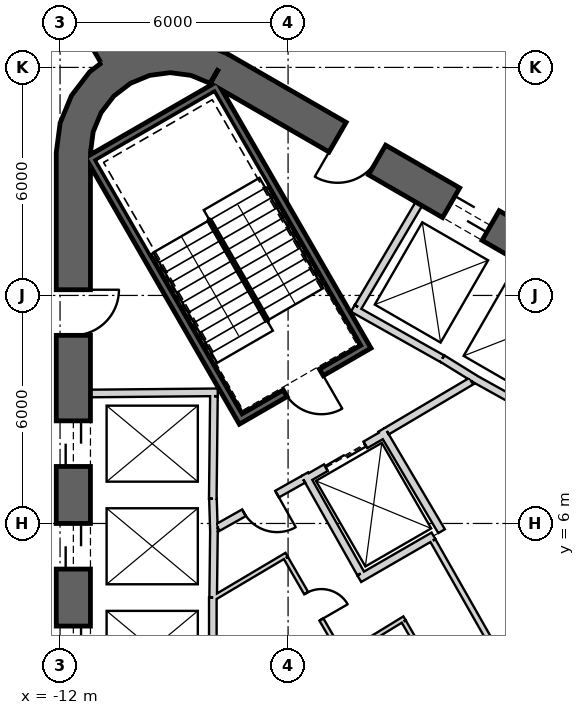
"""IFC4 building model, lengths in metres.
Left out: names, types, materials, properties, quantities, classifications, styles, units other than length and angle.
Written with IfcOpenShell. Run it as: python <this file> out.ifc"""

import sys

from ifc_helpers import new_model, si_unit, direction, frame, frame_2d, origin, place, context, subcontext, project, spatial, polyline, rectangle, outline, extrude, element, fill, save


model = new_model("IFC4")
c1 = context("Model", 3, precision=1e-05, world=origin(), true_north=direction((0.0, 1.0)))
c2 = subcontext(c1, "Body", "Model", "MODEL_VIEW")
j1 = project(units=[si_unit("LENGTHUNIT", "METRE"), si_unit("PLANEANGLEUNIT", "RADIAN")], contexts=[c1])
p1 = place(None, origin())
s1 = spatial("IfcSite", under=j1, at=p1, CompositionType="ELEMENT")
p2 = place(p1, origin())
s2 = spatial("IfcBuilding", under=s1, at=p2, CompositionType="ELEMENT")
p3 = place(p2, frame((0.0, 0.0, 94.7)))
s3 = spatial("IfcBuildingStorey", under=s2, at=p3, CompositionType="ELEMENT", Elevation=94.7)
p4 = place(p3, frame((19.475, 2.208, 0.0), z_axis=(0.0, 0.0, 1.0), x_axis=(-0.866028369851, 0.499994862586, 0.0)))
e1 = element("IfcWall", 1, at=p4, inside=s3, PredefinedType="SHEAR", context=c2, shape_type="SweptSolid", body=[
    extrude(rectangle(XDim=31.523, YDim=0.9, at=frame_2d((15.762, 0.0))), origin(), (0.0, 0.0, 1.0), 4.1),
])
p5 = place(p4, frame((7.062, 0.0, 0.0)))
e2 = element("IfcOpeningElement", 2, at=p5, cuts=e1, PredefinedType="OPENING", context=c2, shape_type="SweptSolid", body=[
    extrude(rectangle(XDim=1.2, YDim=2.4, at=frame_2d((0.6, 1.2))), frame((0.0, 0.46, 0.0), z_axis=(0.0, -1.0, 0.0), x_axis=(1.0, 0.0, 0.0)), (0.0, 0.0, 1.0), 0.92),
])
p6 = place(p4, frame((9.762, 0.0, 0.0)))
e3 = element("IfcOpeningElement", 3, at=p6, cuts=e1, PredefinedType="OPENING", context=c2, shape_type="SweptSolid", body=[
    extrude(rectangle(XDim=1.2, YDim=2.4, at=frame_2d((0.6, 1.2))), frame((0.0, 0.46, 0.0), z_axis=(0.0, -1.0, 0.0), x_axis=(1.0, 0.0, 0.0)), (0.0, 0.0, 1.0), 0.92),
])
p7 = place(p4, frame((12.462, 0.0, 0.0)))
e4 = element("IfcOpeningElement", 4, at=p7, cuts=e1, PredefinedType="OPENING", context=c2, shape_type="SweptSolid", body=[
    extrude(rectangle(XDim=1.2, YDim=2.4, at=frame_2d((0.6, 1.2))), frame((0.0, 0.46, 0.0), z_axis=(0.0, -1.0, 0.0), x_axis=(1.0, 0.0, 0.0)), (0.0, 0.0, 1.0), 0.92),
])
p8 = place(p4, frame((15.162, 0.0, 0.0)))
e5 = element("IfcOpeningElement", 5, at=p8, cuts=e1, PredefinedType="OPENING", context=c2, shape_type="SweptSolid", body=[
    extrude(rectangle(XDim=1.2, YDim=2.4, at=frame_2d((0.6, 1.2))), frame((0.0, 0.46, 0.0), z_axis=(0.0, -1.0, 0.0), x_axis=(1.0, 0.0, 0.0)), (0.0, 0.0, 1.0), 0.92),
])
p9 = place(p4, frame((17.862, 0.0, 0.0)))
e6 = element("IfcOpeningElement", 6, at=p9, cuts=e1, PredefinedType="OPENING", context=c2, shape_type="SweptSolid", body=[
    extrude(rectangle(XDim=1.2, YDim=2.4, at=frame_2d((0.6, 1.2))), frame((0.0, 0.46, 0.0), z_axis=(0.0, -1.0, 0.0), x_axis=(1.0, 0.0, 0.0)), (0.0, 0.0, 1.0), 0.92),
])
p10 = place(p4, frame((20.562, 0.0, 0.0)))
e7 = element("IfcOpeningElement", 7, at=p10, cuts=e1, PredefinedType="OPENING", context=c2, shape_type="SweptSolid", body=[
    extrude(rectangle(XDim=1.2, YDim=2.4, at=frame_2d((0.6, 1.2))), frame((0.0, 0.46, 0.0), z_axis=(0.0, -1.0, 0.0), x_axis=(1.0, 0.0, 0.0)), (0.0, 0.0, 1.0), 0.92),
])
p11 = place(p4, frame((23.262, 0.0, 0.0)))
e8 = element("IfcOpeningElement", 8, at=p11, cuts=e1, PredefinedType="OPENING", context=c2, shape_type="SweptSolid", body=[
    extrude(rectangle(XDim=1.2, YDim=2.4, at=frame_2d((0.6, 1.2))), frame((0.0, 0.46, 0.0), z_axis=(0.0, -1.0, 0.0), x_axis=(1.0, 0.0, 0.0)), (0.0, 0.0, 1.0), 0.92),
])
p12 = place(p4, frame((3.612, 0.0, 0.0)))
e9 = element("IfcOpeningElement", 9, at=p12, cuts=e1, PredefinedType="OPENING", context=c2, shape_type="SweptSolid", body=[
    extrude(rectangle(XDim=1.2, YDim=2.4, at=frame_2d((0.6, 1.2))), frame((0.0, 0.46, 0.0), z_axis=(0.0, -1.0, 0.0), x_axis=(1.0, 0.0, 0.0)), (0.0, 0.0, 1.0), 0.92),
])
p13 = place(p4, frame((26.712, 0.0, 0.0)))
e10 = element("IfcOpeningElement", 10, at=p13, cuts=e1, PredefinedType="OPENING", context=c2, shape_type="SweptSolid", body=[
    extrude(rectangle(XDim=1.2, YDim=2.4, at=frame_2d((0.6, 1.2))), frame((0.0, 0.46, 0.0), z_axis=(0.0, -1.0, 0.0), x_axis=(1.0, 0.0, 0.0)), (0.0, 0.0, 1.0), 0.92),
])
p14 = place(p3, frame((-11.65, 15.762, 0.0), z_axis=(0.0, 0.0, 1.0), x_axis=(0.0, -1.0, 0.0)))
e11 = element("IfcWall", 11, at=p14, inside=s3, PredefinedType="SHEAR", context=c2, shape_type="SweptSolid", body=[
    extrude(rectangle(XDim=31.523, YDim=0.9, at=frame_2d((15.762, 0.0))), origin(), (0.0, 0.0, 1.0), 4.1),
])
p15 = place(p14, frame((7.062, 0.0, 0.0)))
e12 = element("IfcOpeningElement", 12, at=p15, cuts=e11, PredefinedType="OPENING", context=c2, shape_type="SweptSolid", body=[
    extrude(rectangle(XDim=1.2, YDim=2.4, at=frame_2d((0.6, 1.2))), frame((0.0, 0.46, 0.0), z_axis=(0.0, -1.0, 0.0), x_axis=(1.0, 0.0, 0.0)), (0.0, 0.0, 1.0), 0.92),
])
p16 = place(p14, frame((9.762, 0.0, 0.0)))
e13 = element("IfcOpeningElement", 13, at=p16, cuts=e11, PredefinedType="OPENING", context=c2, shape_type="SweptSolid", body=[
    extrude(rectangle(XDim=1.2, YDim=2.4, at=frame_2d((0.6, 1.2))), frame((0.0, 0.46, 0.0), z_axis=(0.0, -1.0, 0.0), x_axis=(1.0, 0.0, 0.0)), (0.0, 0.0, 1.0), 0.92),
])
p17 = place(p14, frame((12.462, 0.0, 0.0)))
e14 = element("IfcOpeningElement", 14, at=p17, cuts=e11, PredefinedType="OPENING", context=c2, shape_type="SweptSolid", body=[
    extrude(rectangle(XDim=1.2, YDim=2.4, at=frame_2d((0.6, 1.2))), frame((0.0, 0.46, 0.0), z_axis=(0.0, -1.0, 0.0), x_axis=(1.0, 0.0, 0.0)), (0.0, 0.0, 1.0), 0.92),
])
p18 = place(p14, frame((15.162, 0.0, 0.0)))
e15 = element("IfcOpeningElement", 15, at=p18, cuts=e11, PredefinedType="OPENING", context=c2, shape_type="SweptSolid", body=[
    extrude(rectangle(XDim=1.2, YDim=2.4, at=frame_2d((0.6, 1.2))), frame((0.0, 0.46, 0.0), z_axis=(0.0, -1.0, 0.0), x_axis=(1.0, 0.0, 0.0)), (0.0, 0.0, 1.0), 0.92),
])
p19 = place(p14, frame((17.862, 0.0, 0.0)))
e16 = element("IfcOpeningElement", 16, at=p19, cuts=e11, PredefinedType="OPENING", context=c2, shape_type="SweptSolid", body=[
    extrude(rectangle(XDim=1.2, YDim=2.4, at=frame_2d((0.6, 1.2))), frame((0.0, 0.46, 0.0), z_axis=(0.0, -1.0, 0.0), x_axis=(1.0, 0.0, 0.0)), (0.0, 0.0, 1.0), 0.92),
])
p20 = place(p14, frame((20.562, 0.0, 0.0)))
e17 = element("IfcOpeningElement", 17, at=p20, cuts=e11, PredefinedType="OPENING", context=c2, shape_type="SweptSolid", body=[
    extrude(rectangle(XDim=1.2, YDim=2.4, at=frame_2d((0.6, 1.2))), frame((0.0, 0.46, 0.0), z_axis=(0.0, -1.0, 0.0), x_axis=(1.0, 0.0, 0.0)), (0.0, 0.0, 1.0), 0.92),
])
p21 = place(p14, frame((23.262, 0.0, 0.0)))
e18 = element("IfcOpeningElement", 18, at=p21, cuts=e11, PredefinedType="OPENING", context=c2, shape_type="SweptSolid", body=[
    extrude(rectangle(XDim=1.2, YDim=2.4, at=frame_2d((0.6, 1.2))), frame((0.0, 0.46, 0.0), z_axis=(0.0, -1.0, 0.0), x_axis=(1.0, 0.0, 0.0)), (0.0, 0.0, 1.0), 0.92),
])
p22 = place(p14, frame((3.612, 0.0, 0.0)))
e19 = element("IfcOpeningElement", 19, at=p22, cuts=e11, PredefinedType="OPENING", context=c2, shape_type="SweptSolid", body=[
    extrude(rectangle(XDim=1.2, YDim=2.4, at=frame_2d((0.6, 1.2))), frame((0.0, 0.46, 0.0), z_axis=(0.0, -1.0, 0.0), x_axis=(1.0, 0.0, 0.0)), (0.0, 0.0, 1.0), 0.92),
])
p23 = place(p14, frame((26.712, 0.0, 0.0)))
e20 = element("IfcOpeningElement", 20, at=p23, cuts=e11, PredefinedType="OPENING", context=c2, shape_type="SweptSolid", body=[
    extrude(rectangle(XDim=1.2, YDim=2.4, at=frame_2d((0.6, 1.2))), frame((0.0, 0.46, 0.0), z_axis=(0.0, -1.0, 0.0), x_axis=(1.0, 0.0, 0.0)), (0.0, 0.0, 1.0), 0.92),
])
p24 = place(p3, origin())
e21 = element("IfcWall", 21, at=p24, inside=s3, PredefinedType="SHEAR", context=c2, shape_type="SweptSolid", body=[
    extrude(outline(polyline([(-7.6, 18.36), (-8.323, 18.659), (-9.1, 18.762), (-9.876, 18.659), (-10.6, 18.36), (-11.221, 17.883), (-11.698, 17.262), (-11.998, 16.538), (-12.1, 15.762), (-11.2, 15.762), (-11.128, 16.305), (-10.919, 16.812), (-10.585, 17.247), (-10.15, 17.58), (-9.644, 17.79), (-9.1, 17.862), (-8.556, 17.79), (-8.05, 17.58), (-7.6, 18.36)])), origin(), (0.0, 0.0, 1.0), 4.1),
])
p25 = place(p3, frame((-10.575, 18.316, 0.0), z_axis=(0.0, 0.0, 1.0), x_axis=(-0.500006018292, 0.866021929094, 0.0)))
e22 = element("IfcWall", 22, at=p25, inside=s3, PredefinedType="SHEAR", context=c2, shape_type="SweptSolid", body=[
    extrude(rectangle(XDim=13.241, YDim=0.8, at=frame_2d((6.621, 0.0))), origin(), (0.0, 0.0, 1.0), 4.1),
])
p26 = place(p25, frame((1.9, 0.0, 0.0)))
e23 = element("IfcOpeningElement", 23, at=p26, cuts=e22, PredefinedType="OPENING", context=c2, shape_type="SweptSolid", body=[
    extrude(rectangle(XDim=1.4, YDim=2.4, at=frame_2d((0.7, 1.2))), frame((0.0, 0.41, 0.0), z_axis=(0.0, -1.0, 0.0), x_axis=(1.0, 0.0, 0.0)), (0.0, 0.0, 1.0), 0.82),
])
p27 = place(p3, frame((-11.2, 9.42, 0.0), z_axis=(0.0, 0.0, 1.0), x_axis=(0.999957167047, 0.009255488683, 0.0)))
e24 = element("IfcWall", 24, at=p27, inside=s3, PredefinedType="PLUMBINGWALL", context=c2, shape_type="SweptSolid", body=[
    extrude(rectangle(XDim=3.35, YDim=0.2, at=frame_2d((1.675, 0.0))), origin(), (0.0, 0.0, 1.0), 3.8),
])
p28 = place(p3, frame((-7.951, 9.35, 0.0), z_axis=(0.0, 0.0, 1.0), x_axis=(-0.011120469654, -0.999938165666, 0.0)))
e25 = element("IfcWall", 25, at=p28, inside=s3, PredefinedType="PLUMBINGWALL", context=c2, shape_type="SweptSolid", body=[
    extrude(rectangle(XDim=2.7, YDim=0.2, at=frame_2d((1.35, 0.0))), origin(), (0.0, 0.0, 1.0), 3.8),
])
p29 = place(p3, frame((-7.977, 6.65, 0.0), z_axis=(0.0, 0.0, 1.0), x_axis=(0.030861509705, -0.999523670164, 0.0)))
e26 = element("IfcWall", 26, at=p29, inside=s3, PredefinedType="PLUMBINGWALL", context=c2, shape_type="SweptSolid", body=[
    extrude(rectangle(XDim=0.878, YDim=0.2, at=frame_2d((0.439, 0.0))), origin(), (0.0, 0.0, 1.0), 3.8),
])
p30 = place(p3, frame((-7.949, 5.895, 0.0), z_axis=(0.0, 0.0, 1.0), x_axis=(-0.012042535896, -0.999927486035, 0.0)))
e27 = element("IfcWall", 27, at=p30, inside=s3, PredefinedType="PLUMBINGWALL", context=c2, shape_type="SweptSolid", body=[
    extrude(rectangle(XDim=1.845, YDim=0.2, at=frame_2d((0.922, 0.0))), origin(), (0.0, 0.0, 1.0), 3.8),
])
p31 = place(p3, frame((-7.98, 4.05, 0.0), z_axis=(0.0, 0.0, 1.0), x_axis=(0.0, -1.0, 0.0)))
e28 = element("IfcWall", 28, at=p31, inside=s3, PredefinedType="PLUMBINGWALL", context=c2, shape_type="SweptSolid", body=[
    extrude(rectangle(XDim=8.1, YDim=0.2, at=frame_2d((4.05, 0.0))), origin(), (0.0, 0.0, 1.0), 3.8),
])
p32 = place(p3, frame((-1.941, 10.339, 0.0), z_axis=(0.0, 0.0, 1.0), x_axis=(0.850216889117, -0.526432561171, 0.0)))
e29 = element("IfcWall", 29, at=p32, inside=s3, PredefinedType="PLUMBINGWALL", context=c2, shape_type="SweptSolid", body=[
    extrude(rectangle(XDim=1.078, YDim=0.2, at=frame_2d((0.539, 0.0))), origin(), (0.0, 0.0, 1.0), 3.8),
])
p33 = place(p3, frame((0.483, 8.936, 0.0), z_axis=(0.0, 0.0, 1.0), x_axis=(-0.874269620932, 0.485440655401, 0.0)))
e30 = element("IfcWall", 30, at=p33, inside=s3, PredefinedType="PLUMBINGWALL", context=c2, shape_type="SweptSolid", body=[
    extrude(rectangle(XDim=1.845, YDim=0.2, at=frame_2d((0.922, 0.0))), origin(), (0.0, 0.0, 1.0), 3.8),
])
p34 = place(p3, frame((-4.296, 11.659, 0.0), z_axis=(0.0, 0.0, 1.0), x_axis=(0.871534483978, -0.490334215854, 0.0)))
e31 = element("IfcWall", 31, at=p34, inside=s3, PredefinedType="PLUMBINGWALL", context=c2, shape_type="SweptSolid", body=[
    extrude(rectangle(XDim=2.7, YDim=0.2, at=frame_2d((1.35, 0.0))), origin(), (0.0, 0.0, 1.0), 3.8),
])
p35 = place(p3, frame((-4.158, 11.696, 0.0), z_axis=(0.0, 0.0, 1.0), x_axis=(0.508018930956, 0.861345903683, 0.0)))
e32 = element("IfcWall", 32, at=p35, inside=s3, PredefinedType="PLUMBINGWALL", context=c2, shape_type="SweptSolid", body=[
    extrude(rectangle(XDim=3.15, YDim=0.2, at=frame_2d((1.575, 0.0))), origin(), (0.0, 0.0, 1.0), 3.8),
])
p36 = place(p3, frame((-11.245, 15.678, -0.3), z_axis=(0.0, 0.0, 1.0), x_axis=(0.499977274689, -0.866038523851, 0.0)))
e33 = element("IfcWall", 33, at=p36, inside=s3, PredefinedType="SHEAR", context=c2, shape_type="SweptSolid", body=[
    extrude(rectangle(XDim=8.1, YDim=0.2, at=frame_2d((4.05, 0.0))), origin(), (0.0, 0.0, 1.0), 4.1),
])
p37 = place(p3, frame((-7.818, 17.541, -0.3), z_axis=(0.0, 0.0, 1.0), x_axis=(-0.866044365799, -0.499967155389, 0.0)))
e34 = element("IfcWall", 34, at=p37, inside=s3, PredefinedType="SHEAR", context=c2, shape_type="SweptSolid", body=[
    extrude(rectangle(XDim=3.8, YDim=0.2, at=frame_2d((1.9, 0.0))), origin(), (0.0, 0.0, 1.0), 4.1),
])
p38 = place(p3, frame((-7.854, 17.405, -0.3), z_axis=(0.0, 0.0, 1.0), x_axis=(0.499997992926, -0.866026562566, 0.0)))
e35 = element("IfcWall", 35, at=p38, inside=s3, PredefinedType="SHEAR", context=c2, shape_type="SweptSolid", body=[
    extrude(rectangle(XDim=7.9, YDim=0.2, at=frame_2d((3.95, 0.0))), origin(), (0.0, 0.0, 1.0), 4.1),
])
p39 = place(p3, frame((-7.159, 8.8, -0.3), z_axis=(0.0, 0.0, 1.0), x_axis=(0.866047807691, 0.499961193289, 0.0)))
e36 = element("IfcWall", 36, at=p39, inside=s3, PredefinedType="SHEAR", context=c2, shape_type="SweptSolid", body=[
    extrude(rectangle(XDim=3.6, YDim=0.2, at=frame_2d((1.8, 0.0))), origin(), (0.0, 0.0, 1.0), 4.1),
])
p40 = place(p39, frame((1.25, 0.0, 0.3)))
e37 = element("IfcOpeningElement", 37, at=p40, cuts=e36, PredefinedType="OPENING", context=c2, shape_type="SweptSolid", body=[
    extrude(rectangle(XDim=1.1, YDim=2.1, at=frame_2d((0.55, 1.05))), frame((0.0, 0.11, 0.0), z_axis=(0.0, -1.0, 0.0), x_axis=(1.0, 0.0, 0.0)), (0.0, 0.0, 1.0), 0.22),
])
p41 = place(p3, frame((-5.524, 7.168, 0.0), z_axis=(0.0, 0.0, 1.0), x_axis=(0.866024647952, 0.500001309137, 0.0)))
e38 = element("IfcWall", 38, at=p41, inside=s3, PredefinedType="PLUMBINGWALL", context=c2, shape_type="SweptSolid", body=[
    extrude(rectangle(XDim=2.4, YDim=0.2, at=frame_2d((1.2, 0.0))), origin(), (0.0, 0.0, 1.0), 3.8),
])
p42 = place(p41, frame((0.6, 0.0, 0.0)))
e39 = element("IfcOpeningElement", 39, at=p42, cuts=e38, PredefinedType="OPENING", context=c2, shape_type="SweptSolid", body=[
    extrude(rectangle(XDim=1.2, YDim=2.4, at=frame_2d((0.6, 1.2))), frame((0.0, 0.11, 0.0), z_axis=(0.0, -1.0, 0.0), x_axis=(1.0, 0.0, 0.0)), (0.0, 0.0, 1.0), 0.22),
])
p43 = place(p3, frame((-3.538, 8.465, 0.0), z_axis=(0.0, 0.0, 1.0), x_axis=(0.508647062354, -0.860975125052, 0.0)))
e40 = element("IfcWall", 40, at=p43, inside=s3, PredefinedType="PLUMBINGWALL", context=c2, shape_type="SweptSolid", body=[
    extrude(rectangle(XDim=3.1, YDim=0.2, at=frame_2d((1.55, 0.0))), origin(), (0.0, 0.0, 1.0), 3.8),
])
p44 = place(p3, frame((-2.173, 5.673, 0.0), z_axis=(0.0, 0.0, 1.0), x_axis=(-0.866028691075, -0.499994306202, 0.0)))
e41 = element("IfcWall", 41, at=p44, inside=s3, PredefinedType="PLUMBINGWALL", context=c2, shape_type="SweptSolid", body=[
    extrude(rectangle(XDim=2.254, YDim=0.2, at=frame_2d((1.127, 0.0))), origin(), (0.0, 0.0, 1.0), 3.8),
])
p45 = place(p3, frame((-5.562, 7.296, 0.0), z_axis=(0.0, 0.0, 1.0), x_axis=(0.49134651263, -0.870964180966, 0.0)))
e42 = element("IfcWall", 42, at=p45, inside=s3, PredefinedType="PLUMBINGWALL", context=c2, shape_type="SweptSolid", body=[
    extrude(rectangle(XDim=3.0, YDim=0.2, at=frame_2d((1.5, 0.0))), origin(), (0.0, 0.0, 1.0), 3.8),
])
p46 = place(p3, frame((-1.18, 9.744, 0.0), z_axis=(0.0, 0.0, 1.0), x_axis=(-0.860615607571, -0.509255118781, 0.0)))
e43 = element("IfcWall", 43, at=p46, inside=s3, PredefinedType="PARTITIONING", context=c2, shape_type="SweptSolid", body=[
    extrude(rectangle(XDim=2.581, YDim=0.2, at=frame_2d((1.29, 0.0))), origin(), (0.0, 0.0, 1.0), 3.8),
])
p47 = place(p3, frame((-5.6, 7.16, 0.0), z_axis=(0.0, 0.0, 1.0), x_axis=(-0.871363259478, -0.490638431059, 0.0)))
e44 = element("IfcWall", 44, at=p47, inside=s3, PredefinedType="PARTITIONING", context=c2, shape_type="SweptSolid", body=[
    extrude(rectangle(XDim=2.581, YDim=0.2, at=frame_2d((1.291, 0.0))), origin(), (0.0, 0.0, 1.0), 3.8),
])
p48 = place(p47, frame((0.791, 0.0, 0.0)))
e45 = element("IfcOpeningElement", 45, at=p48, cuts=e44, PredefinedType="OPENING", context=c2, shape_type="SweptSolid", body=[
    extrude(rectangle(XDim=1.0, YDim=2.1, at=frame_2d((0.5, 1.05))), frame((0.0, 0.11, 0.0), z_axis=(0.0, -1.0, 0.0), x_axis=(1.0, 0.0, 0.0)), (0.0, 0.0, 1.0), 0.22),
])
p49 = place(p3, frame((-2.189, 5.549, 0.0), z_axis=(0.0, 0.0, 1.0), x_axis=(0.494335077001, -0.869271437266, 0.0)))
e46 = element("IfcWall", 46, at=p49, inside=s3, PredefinedType="PLUMBINGWALL", context=c2, shape_type="SweptSolid", body=[
    extrude(rectangle(XDim=4.404, YDim=0.15, at=frame_2d((2.202, 0.0))), origin(), (0.0, 0.0, 1.0), 3.8),
])
p50 = place(p3, frame((-6.037, 5.176, 0.0), z_axis=(0.0, 0.0, 1.0), x_axis=(-0.860106072674, -0.510115225953, 0.0)))
e47 = element("IfcWall", 47, at=p50, inside=s3, PredefinedType="PARTITIONING", context=c2, shape_type="SweptSolid", body=[
    extrude(rectangle(XDim=2.225, YDim=0.12, at=frame_2d((1.112, 0.0))), origin(), (0.0, 0.0, 1.0), 3.8),
])
p51 = place(p3, frame((-4.558, 2.495, 0.0), z_axis=(0.0, 0.0, 1.0), x_axis=(-0.499990139034, 0.866031096941, 0.0)))
e48 = element("IfcWall", 48, at=p51, inside=s3, PredefinedType="PARTITIONING", context=c2, shape_type="SweptSolid", body=[
    extrude(rectangle(XDim=3.0, YDim=0.12, at=frame_2d((1.5, 0.0))), origin(), (0.0, 0.0, 1.0), 3.8),
])
p52 = place(p51, frame((1.13, 0.0, 0.0)))
e49 = element("IfcOpeningElement", 49, at=p52, cuts=e48, PredefinedType="OPENING", context=c2, shape_type="SweptSolid", body=[
    extrude(rectangle(XDim=0.8, YDim=2.1, at=frame_2d((0.4, 1.05))), frame((0.0, 0.07, 0.0), z_axis=(0.0, -1.0, 0.0), x_axis=(1.0, 0.0, 0.0)), (0.0, 0.0, 1.0), 0.14),
])
p53 = place(p3, frame((-2.935, 3.503, 0.0), z_axis=(0.0, 0.0, 1.0), x_axis=(-0.852471794044, -0.522773220774, 0.0)))
e50 = element("IfcWall", 50, at=p53, inside=s3, PredefinedType="PARTITIONING", context=c2, shape_type="SweptSolid", body=[
    extrude(rectangle(XDim=1.112, YDim=0.12, at=frame_2d((0.556, 0.0))), origin(), (0.0, 0.0, 1.0), 3.8),
])
p54 = place(p3, frame((-1.42, 0.76, 0.0), z_axis=(0.0, 0.0, 1.0), x_axis=(-0.500011413361, 0.866018814177, 0.0)))
e51 = element("IfcWall", 51, at=p54, inside=s3, PredefinedType="PARTITIONING", context=c2, shape_type="SweptSolid", body=[
    extrude(rectangle(XDim=3.072, YDim=0.12, at=frame_2d((1.536, 0.0))), origin(), (0.0, 0.0, 1.0), 3.8),
])
p55 = place(p3, frame((1.506, 18.183, 0.0), z_axis=(0.0, 0.0, 1.0), x_axis=(-0.866028170149, 0.499995208485, 0.0)))
e52 = element("IfcWall", 52, at=p55, inside=s3, PredefinedType="PARTITIONING", context=c2, shape_type="SweptSolid", body=[
    extrude(rectangle(XDim=8.729, YDim=0.2, at=frame_2d((4.365, 0.0))), origin(), (0.0, 0.0, 1.0), 2.98),
])
p56 = place(p55, frame((3.865, 0.0, 0.0)))
e53 = element("IfcOpeningElement", 53, at=p56, cuts=e52, PredefinedType="OPENING", context=c2, shape_type="SweptSolid", body=[
    extrude(rectangle(XDim=1.0, YDim=2.1, at=frame_2d((0.5, 1.05))), frame((0.0, 0.11, 0.0), z_axis=(0.0, -1.0, 0.0), x_axis=(1.0, 0.0, 0.0)), (0.0, 0.0, 1.0), 0.22),
])
p57 = place(p40, origin())
e54 = element("IfcDoor", 54, at=p57, inside=s3, OperationType="SINGLE_SWING_RIGHT", PredefinedType="USERDEFINED", context=c2, shape_type="SweptSolid", body=[
    extrude(rectangle(XDim=1.1, YDim=2.1, at=frame_2d((0.55, 1.05))), frame((0.0, 0.025, 0.0), z_axis=(0.0, -1.0, 0.0), x_axis=(1.0, 0.0, 0.0)), (0.0, 0.0, 1.0), 0.05),
])
fill(e37, e54)
p58 = place(p48, origin())
e55 = element("IfcDoor", 55, at=p58, inside=s3, OperationType="SINGLE_SWING_RIGHT", PredefinedType="USERDEFINED", context=c2, shape_type="SweptSolid", body=[
    extrude(rectangle(XDim=1.0, YDim=2.1, at=frame_2d((0.5, 1.05))), frame((0.0, 0.025, 0.0), z_axis=(0.0, -1.0, 0.0), x_axis=(1.0, 0.0, 0.0)), (0.0, 0.0, 1.0), 0.05),
])
fill(e45, e55)
p59 = place(p42, origin())
e56 = element("IfcDoor", 56, at=p59, inside=s3, OperationType="SLIDING_TO_LEFT", PredefinedType="USERDEFINED", context=c2, shape_type="SweptSolid", body=[
    extrude(rectangle(XDim=1.2, YDim=2.4, at=frame_2d((0.6, 1.2))), frame((0.0, 0.025, 0.0), z_axis=(0.0, -1.0, 0.0), x_axis=(1.0, 0.0, 0.0)), (0.0, 0.0, 1.0), 0.05),
])
fill(e39, e56)
p60 = place(p52, origin())
e57 = element("IfcDoor", 57, at=p60, inside=s3, OperationType="SINGLE_SWING_LEFT", PredefinedType="USERDEFINED", context=c2, shape_type="SweptSolid", body=[
    extrude(rectangle(XDim=0.8, YDim=2.1, at=frame_2d((0.4, 1.05))), frame((0.0, 0.025, 0.0), z_axis=(0.0, -1.0, 0.0), x_axis=(1.0, 0.0, 0.0)), (0.0, 0.0, 1.0), 0.05),
])
fill(e49, e57)
p61 = place(p15, origin())
e58 = element("IfcDoor", 58, at=p61, inside=s3, OperationType="SLIDING_TO_LEFT", PredefinedType="USERDEFINED", context=c2, shape_type="SweptSolid", body=[
    extrude(rectangle(XDim=1.2, YDim=2.4, at=frame_2d((0.6, 1.2))), frame((0.0, 0.025, 0.0), z_axis=(0.0, -1.0, 0.0), x_axis=(1.0, 0.0, 0.0)), (0.0, 0.0, 1.0), 0.05),
])
fill(e12, e58)
p62 = place(p16, origin())
e59 = element("IfcDoor", 59, at=p62, inside=s3, OperationType="SLIDING_TO_LEFT", PredefinedType="USERDEFINED", context=c2, shape_type="SweptSolid", body=[
    extrude(rectangle(XDim=1.2, YDim=2.4, at=frame_2d((0.6, 1.2))), frame((0.0, 0.025, 0.0), z_axis=(0.0, -1.0, 0.0), x_axis=(1.0, 0.0, 0.0)), (0.0, 0.0, 1.0), 0.05),
])
fill(e13, e59)
p63 = place(p17, origin())
e60 = element("IfcDoor", 60, at=p63, inside=s3, OperationType="SLIDING_TO_LEFT", PredefinedType="USERDEFINED", context=c2, shape_type="SweptSolid", body=[
    extrude(rectangle(XDim=1.2, YDim=2.4, at=frame_2d((0.6, 1.2))), frame((0.0, 0.025, 0.0), z_axis=(0.0, -1.0, 0.0), x_axis=(1.0, 0.0, 0.0)), (0.0, 0.0, 1.0), 0.05),
])
fill(e14, e60)
p64 = place(p11, origin())
e61 = element("IfcDoor", 61, at=p64, inside=s3, OperationType="SLIDING_TO_LEFT", PredefinedType="USERDEFINED", context=c2, shape_type="SweptSolid", body=[
    extrude(rectangle(XDim=1.2, YDim=2.4, at=frame_2d((0.6, 1.2))), frame((0.0, 0.025, 0.0), z_axis=(0.0, -1.0, 0.0), x_axis=(1.0, 0.0, 0.0)), (0.0, 0.0, 1.0), 0.05),
])
fill(e8, e61)
p65 = place(p13, origin())
e62 = element("IfcDoor", 62, at=p65, inside=s3, OperationType="SINGLE_SWING_RIGHT", PredefinedType="USERDEFINED", context=c2, shape_type="SweptSolid", body=[
    extrude(rectangle(XDim=1.2, YDim=2.4, at=frame_2d((0.6, 1.2))), frame((0.0, 0.025, 0.0), z_axis=(0.0, -1.0, 0.0), x_axis=(1.0, 0.0, 0.0)), (0.0, 0.0, 1.0), 0.05),
])
fill(e10, e62)
p66 = place(p22, origin())
e63 = element("IfcDoor", 63, at=p66, inside=s3, OperationType="SINGLE_SWING_LEFT", PredefinedType="USERDEFINED", context=c2, shape_type="SweptSolid", body=[
    extrude(rectangle(XDim=1.2, YDim=2.4, at=frame_2d((0.6, 1.2))), frame((0.0, 0.025, 0.0), z_axis=(0.0, -1.0, 0.0), x_axis=(1.0, 0.0, 0.0)), (0.0, 0.0, 1.0), 0.05),
])
fill(e19, e63)
save(model, sys.argv[1])
